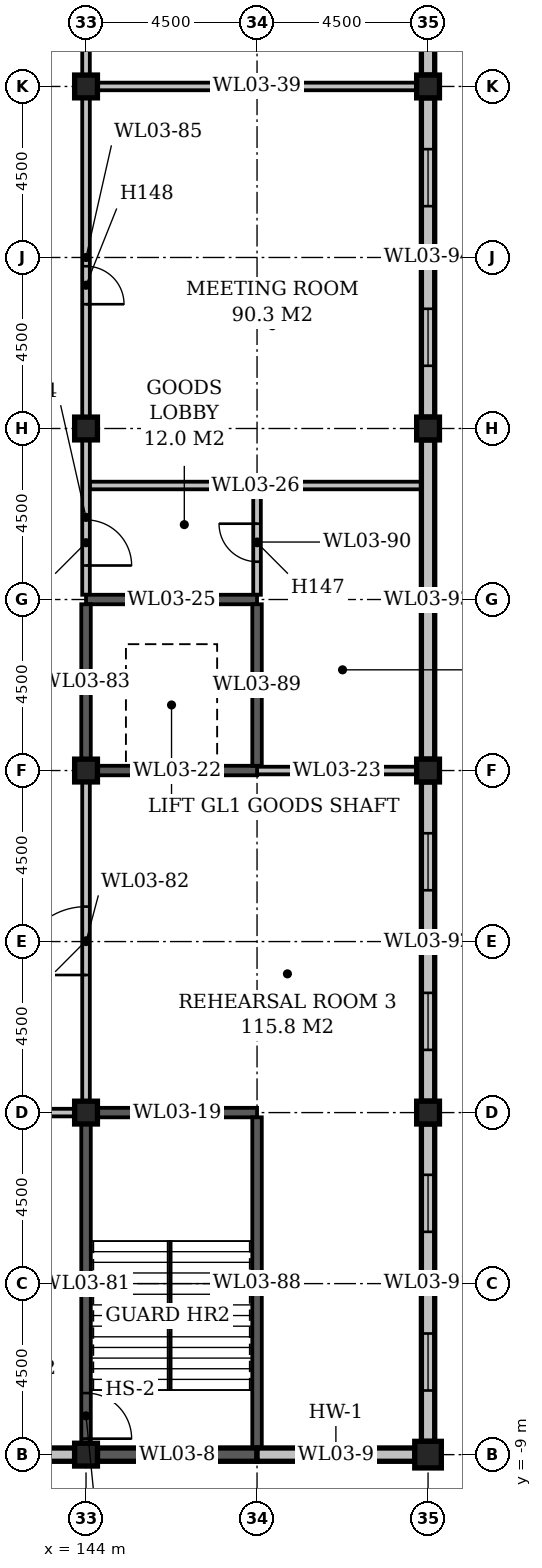
"""IFC4 building model, lengths in metres.
Left out: names, types, materials, properties, quantities, classifications, styles, units other than length and angle.
Written with IfcOpenShell. Run it as: python <this file> out.ifc"""

import sys

from ifc_helpers import new_model, si_unit, direction, frame, frame_2d, origin, origin_2d, place, context, subcontext, project, spatial, rectangle, extrude, element, fill, save


model = new_model("IFC4")
c1 = context("Model", 3, precision=1e-05, world=origin(), true_north=direction((0.0, 1.0)))
c2 = subcontext(c1, "Body", "Model", "MODEL_VIEW")
j1 = project(units=[si_unit("LENGTHUNIT", "METRE"), si_unit("PLANEANGLEUNIT", "RADIAN")], contexts=[c1])
p1 = place(None, origin())
s1 = spatial("IfcSite", under=j1, at=p1, CompositionType="ELEMENT")
p2 = place(p1, origin())
s2 = spatial("IfcBuilding", under=s1, at=p2, CompositionType="ELEMENT")
p3 = place(p2, frame((0.0, 0.0, 19.0)))
s3 = spatial("IfcBuildingStorey", under=s2, at=p3, CompositionType="ELEMENT", Elevation=19.0)
for number, where, z_axis, x_axis in (
    (1, (144.0, -9.0, 0.0), (0.0, 0.0, 1.0), (1.0, 0.0, 0.0)),
    (2, (144.0, 0.0, 0.0), (0.0, 0.0, 1.0), (1.0, 0.0, 0.0)),
    (3, (144.0, 9.0, 0.0), (0.0, 0.0, 1.0), (1.0, 0.0, 0.0)),
    (4, (144.0, 18.0, 0.0), (0.0, 0.0, 1.0), (1.0, 0.0, 0.0)),
    (5, (144.0, 27.0, 0.0), (0.0, 0.0, 1.0), (1.0, 0.0, 0.0)),
):
    element("IfcColumn", number, at=place(p3, frame(where, z_axis=z_axis, x_axis=x_axis)), inside=s3, PredefinedType="COLUMN", context=c2, shape_type="SweptSolid", body=[
        extrude(rectangle(XDim=0.6, YDim=0.6, at=origin_2d()), origin(), (0.0, 0.0, 1.0), 4.7),
    ])
p4 = place(p3, frame((153.0, -9.0, 0.0), z_axis=(0.0, 0.0, 1.0), x_axis=(1.0, 0.0, 0.0)))
e6 = element("IfcColumn", 6, at=p4, inside=s3, PredefinedType="COLUMN", context=c2, shape_type="SweptSolid", body=[
    extrude(rectangle(XDim=0.7, YDim=0.7, at=origin_2d()), origin(), (0.0, 0.0, 1.0), 4.7),
])
for number, where, z_axis, x_axis in (
    (7, (153.0, 0.0, 0.0), (0.0, 0.0, 1.0), (1.0, 0.0, 0.0)),
    (8, (153.0, 9.0, 0.0), (0.0, 0.0, 1.0), (1.0, 0.0, 0.0)),
    (9, (153.0, 18.0, 0.0), (0.0, 0.0, 1.0), (1.0, 0.0, 0.0)),
    (10, (153.0, 27.0, 0.0), (0.0, 0.0, 1.0), (1.0, 0.0, 0.0)),
):
    element("IfcColumn", number, at=place(p3, frame(where, z_axis=z_axis, x_axis=x_axis)), inside=s3, PredefinedType="COLUMN", context=c2, shape_type="SweptSolid", body=[
        extrude(rectangle(XDim=0.6, YDim=0.6, at=origin_2d()), origin(), (0.0, 0.0, 1.0), 4.7),
    ])
p5 = place(p3, frame((135.3, -9.0, 0.0), z_axis=(0.0, 0.0, 1.0), x_axis=(1.0, 0.0, 0.0)))
e11 = element("IfcWall", 11, at=p5, inside=s3, PredefinedType="STANDARD", context=c2, shape_type="SweptSolid", body=[
    extrude(rectangle(XDim=8.4, YDim=0.35, at=frame_2d((4.2, 0.0))), origin(), (0.0, 0.0, 1.0), 4.1),
])
p6 = place(p5, frame((1.35, 0.0, 1.0)))
e12 = element("IfcOpeningElement", 12, at=p6, cuts=e11, PredefinedType="OPENING", context=c2, shape_type="SweptSolid", body=[
    extrude(rectangle(XDim=1.5, YDim=2.4, at=frame_2d((0.75, 1.2))), frame((0.0, 0.187, 0.0), z_axis=(0.0, -1.0, 0.0), x_axis=(1.0, 0.0, 0.0)), (0.0, 0.0, 1.0), 0.374),
])
p7 = place(p3, frame((144.3, -9.0, 0.0), z_axis=(0.0, 0.0, 1.0), x_axis=(1.0, 0.0, 0.0)))
e13 = element("IfcWall", 13, at=p7, inside=s3, PredefinedType="STANDARD", context=c2, shape_type="SweptSolid", body=[
    extrude(rectangle(XDim=4.2, YDim=0.35, at=frame_2d((2.1, 0.0))), origin(), (0.0, 0.0, 1.0), 5.0),
])
p8 = place(p3, frame((148.5, -9.0, 0.0), z_axis=(0.0, 0.0, 1.0), x_axis=(1.0, 0.0, 0.0)))
e14 = element("IfcWall", 14, at=p8, inside=s3, PredefinedType="STANDARD", context=c2, shape_type="SweptSolid", body=[
    extrude(rectangle(XDim=4.15, YDim=0.35, at=frame_2d((2.075, 0.0))), origin(), (0.0, 0.0, 1.0), 4.1),
])
p9 = place(p8, frame((1.325, 0.0, 1.0)))
e15 = element("IfcOpeningElement", 15, at=p9, cuts=e14, PredefinedType="OPENING", context=c2, shape_type="SweptSolid", body=[
    extrude(rectangle(XDim=1.5, YDim=2.4, at=frame_2d((0.75, 1.2))), frame((0.0, 0.187, 0.0), z_axis=(0.0, -1.0, 0.0), x_axis=(1.0, 0.0, 0.0)), (0.0, 0.0, 1.0), 0.374),
])
p10 = place(p3, frame((135.4, 0.0, 0.0), z_axis=(0.0, 0.0, 1.0), x_axis=(1.0, 0.0, 0.0)))
e16 = element("IfcWall", 16, at=p10, inside=s3, PredefinedType="STANDARD", context=c2, shape_type="SweptSolid", body=[
    extrude(rectangle(XDim=8.3, YDim=0.2, at=frame_2d((4.15, 0.0))), origin(), (0.0, 0.0, 1.0), 4.7),
])
p11 = place(p10, frame((5.77, 0.0, 0.0)))
e17 = element("IfcOpeningElement", 17, at=p11, cuts=e16, PredefinedType="OPENING", context=c2, shape_type="SweptSolid", body=[
    extrude(rectangle(XDim=1.2, YDim=2.1, at=frame_2d((0.6, 1.05))), frame((0.0, 0.112, 0.0), z_axis=(0.0, -1.0, 0.0), x_axis=(1.0, 0.0, 0.0)), (0.0, 0.0, 1.0), 0.224),
])
p12 = place(p10, frame((1.37, 0.0, 0.0)))
e18 = element("IfcOpeningElement", 18, at=p12, cuts=e16, PredefinedType="OPENING", context=c2, shape_type="SweptSolid", body=[
    extrude(rectangle(XDim=1.0, YDim=2.1, at=frame_2d((0.5, 1.05))), frame((0.0, 0.112, 0.0), z_axis=(0.0, -1.0, 0.0), x_axis=(1.0, 0.0, 0.0)), (0.0, 0.0, 1.0), 0.224),
])
for number, where, z_axis, x_axis in (
    (19, (144.3, 0.0, 0.0), (0.0, 0.0, 1.0), (1.0, 0.0, 0.0)),
    (20, (144.3, 9.0, 0.0), (0.0, 0.0, 1.0), (1.0, 0.0, 0.0)),
):
    element("IfcWall", number, at=place(p3, frame(where, z_axis=z_axis, x_axis=x_axis)), inside=s3, PredefinedType="STANDARD", context=c2, shape_type="SweptSolid", body=[
        extrude(rectangle(XDim=4.2, YDim=0.25, at=frame_2d((2.1, 0.0))), origin(), (0.0, 0.0, 1.0), 5.0),
    ])
p13 = place(p3, frame((148.5, 9.0, 0.0), z_axis=(0.0, 0.0, 1.0), x_axis=(1.0, 0.0, 0.0)))
e21 = element("IfcWall", 21, at=p13, inside=s3, PredefinedType="STANDARD", context=c2, shape_type="SweptSolid", body=[
    extrude(rectangle(XDim=4.2, YDim=0.2, at=frame_2d((2.1, 0.0))), origin(), (0.0, 0.0, 1.0), 4.7),
])
p14 = place(p3, frame((144.0, 13.5, 0.0), z_axis=(0.0, 0.0, 1.0), x_axis=(1.0, 0.0, 0.0)))
e22 = element("IfcWall", 22, at=p14, inside=s3, PredefinedType="STANDARD", context=c2, shape_type="SweptSolid", body=[
    extrude(rectangle(XDim=4.5, YDim=0.25, at=frame_2d((2.25, 0.0))), origin(), (0.0, 0.0, 1.0), 5.0),
])
p15 = place(p14, frame((1.72, 0.0, 0.0)))
e23 = element("IfcOpeningElement", 23, at=p15, cuts=e22, PredefinedType="OPENING", context=c2, shape_type="SweptSolid", body=[
    extrude(rectangle(XDim=1.1, YDim=2.1, at=frame_2d((0.55, 1.05))), frame((0.0, 0.137, 0.0), z_axis=(0.0, -1.0, 0.0), x_axis=(1.0, 0.0, 0.0)), (0.0, 0.0, 1.0), 0.274),
])
p16 = place(p3, frame((144.1, 16.5, 0.0), z_axis=(0.0, 0.0, 1.0), x_axis=(1.0, 0.0, 0.0)))
e24 = element("IfcWall", 24, at=p16, inside=s3, PredefinedType="STANDARD", context=c2, shape_type="SweptSolid", body=[
    extrude(rectangle(XDim=8.725, YDim=0.2, at=frame_2d((4.362, 0.0))), origin(), (0.0, 0.0, 1.0), 4.7),
])
p17 = place(p3, frame((144.3, 27.0, 0.0), z_axis=(0.0, 0.0, 1.0), x_axis=(1.0, 0.0, 0.0)))
e25 = element("IfcWall", 25, at=p17, inside=s3, PredefinedType="STANDARD", context=c2, shape_type="SweptSolid", body=[
    extrude(rectangle(XDim=8.4, YDim=0.2, at=frame_2d((4.2, 0.0))), origin(), (0.0, 0.0, 1.0), 4.7),
])
p18 = place(p3, frame((144.0, -8.7, 0.0), z_axis=(0.0, 0.0, 1.0), x_axis=(0.0, 1.0, 0.0)))
e26 = element("IfcWall", 26, at=p18, inside=s3, PredefinedType="STANDARD", context=c2, shape_type="SweptSolid", body=[
    extrude(rectangle(XDim=8.4, YDim=0.25, at=frame_2d((4.2, 0.0))), origin(), (0.0, 0.0, 1.0), 5.0),
])
p19 = place(p18, frame((0.12, 0.0, 0.0)))
e27 = element("IfcOpeningElement", 27, at=p19, cuts=e26, PredefinedType="OPENING", context=c2, shape_type="SweptSolid", body=[
    extrude(rectangle(XDim=1.2, YDim=2.1, at=frame_2d((0.6, 1.05))), frame((0.0, 0.137, 0.0), z_axis=(0.0, -1.0, 0.0), x_axis=(1.0, 0.0, 0.0)), (0.0, 0.0, 1.0), 0.274),
])
p20 = place(p3, frame((144.0, 0.3, 0.0), z_axis=(0.0, 0.0, 1.0), x_axis=(0.0, 1.0, 0.0)))
e28 = element("IfcWall", 28, at=p20, inside=s3, PredefinedType="STANDARD", context=c2, shape_type="SweptSolid", body=[
    extrude(rectangle(XDim=8.4, YDim=0.2, at=frame_2d((4.2, 0.0))), origin(), (0.0, 0.0, 1.0), 4.7),
])
p21 = place(p20, frame((3.32, 0.0, 0.0)))
e29 = element("IfcOpeningElement", 29, at=p21, cuts=e28, PredefinedType="OPENING", context=c2, shape_type="SweptSolid", body=[
    extrude(rectangle(XDim=1.8, YDim=2.4, at=frame_2d((0.9, 1.2))), frame((0.0, 0.112, 0.0), z_axis=(0.0, -1.0, 0.0), x_axis=(1.0, 0.0, 0.0)), (0.0, 0.0, 1.0), 0.224),
])
p22 = place(p3, frame((144.0, 9.3, 0.0), z_axis=(0.0, 0.0, 1.0), x_axis=(0.0, 1.0, 0.0)))
e30 = element("IfcWall", 30, at=p22, inside=s3, PredefinedType="STANDARD", context=c2, shape_type="SweptSolid", body=[
    extrude(rectangle(XDim=4.075, YDim=0.25, at=frame_2d((2.038, 0.0))), origin(), (0.0, 0.0, 1.0), 5.0),
])
p23 = place(p3, frame((144.0, 13.625, 0.0), z_axis=(0.0, 0.0, 1.0), x_axis=(0.0, 1.0, 0.0)))
e31 = element("IfcWall", 31, at=p23, inside=s3, PredefinedType="STANDARD", context=c2, shape_type="SweptSolid", body=[
    extrude(rectangle(XDim=4.075, YDim=0.2, at=frame_2d((2.038, 0.0))), origin(), (0.0, 0.0, 1.0), 4.7),
])
p24 = place(p23, frame((0.77, 0.0, 0.0)))
e32 = element("IfcOpeningElement", 32, at=p24, cuts=e31, PredefinedType="OPENING", context=c2, shape_type="SweptSolid", body=[
    extrude(rectangle(XDim=1.2, YDim=2.1, at=frame_2d((0.6, 1.05))), frame((0.0, 0.112, 0.0), z_axis=(0.0, -1.0, 0.0), x_axis=(1.0, 0.0, 0.0)), (0.0, 0.0, 1.0), 0.224),
])
p25 = place(p3, frame((144.0, 18.3, 0.0), z_axis=(0.0, 0.0, 1.0), x_axis=(0.0, 1.0, 0.0)))
e33 = element("IfcWall", 33, at=p25, inside=s3, PredefinedType="STANDARD", context=c2, shape_type="SweptSolid", body=[
    extrude(rectangle(XDim=8.4, YDim=0.2, at=frame_2d((4.2, 0.0))), origin(), (0.0, 0.0, 1.0), 4.7),
])
p26 = place(p25, frame((2.97, 0.0, 0.0)))
e34 = element("IfcOpeningElement", 34, at=p26, cuts=e33, PredefinedType="OPENING", context=c2, shape_type="SweptSolid", body=[
    extrude(rectangle(XDim=1.0, YDim=2.1, at=frame_2d((0.5, 1.05))), frame((0.0, 0.112, 0.0), z_axis=(0.0, -1.0, 0.0), x_axis=(1.0, 0.0, 0.0)), (0.0, 0.0, 1.0), 0.224),
])
p27 = place(p3, frame((144.0, 27.3, 0.0), z_axis=(0.0, 0.0, 1.0), x_axis=(0.0, 1.0, 0.0)))
e35 = element("IfcWall", 35, at=p27, inside=s3, PredefinedType="STANDARD", context=c2, shape_type="SweptSolid", body=[
    extrude(rectangle(XDim=8.4, YDim=0.2, at=frame_2d((4.2, 0.0))), origin(), (0.0, 0.0, 1.0), 4.7),
])
p28 = place(p27, frame((3.72, 0.0, 0.0)))
e36 = element("IfcOpeningElement", 36, at=p28, cuts=e35, PredefinedType="OPENING", context=c2, shape_type="SweptSolid", body=[
    extrude(rectangle(XDim=1.0, YDim=2.1, at=frame_2d((0.5, 1.05))), frame((0.0, 0.112, 0.0), z_axis=(0.0, -1.0, 0.0), x_axis=(1.0, 0.0, 0.0)), (0.0, 0.0, 1.0), 0.224),
])
p29 = place(p3, frame((148.5, -8.825, 0.0), z_axis=(0.0, 0.0, 1.0), x_axis=(0.0, 1.0, 0.0)))
e37 = element("IfcWall", 37, at=p29, inside=s3, PredefinedType="STANDARD", context=c2, shape_type="SweptSolid", body=[
    extrude(rectangle(XDim=8.7, YDim=0.25, at=frame_2d((4.35, 0.0))), origin(), (0.0, 0.0, 1.0), 5.0),
])
p30 = place(p3, frame((148.5, 9.125, 0.0), z_axis=(0.0, 0.0, 1.0), x_axis=(0.0, 1.0, 0.0)))
e38 = element("IfcWall", 38, at=p30, inside=s3, PredefinedType="STANDARD", context=c2, shape_type="SweptSolid", body=[
    extrude(rectangle(XDim=4.25, YDim=0.25, at=frame_2d((2.125, 0.0))), origin(), (0.0, 0.0, 1.0), 5.0),
])
p31 = place(p3, frame((148.5, 13.625, 0.0), z_axis=(0.0, 0.0, 1.0), x_axis=(0.0, 1.0, 0.0)))
e39 = element("IfcWall", 39, at=p31, inside=s3, PredefinedType="STANDARD", context=c2, shape_type="SweptSolid", body=[
    extrude(rectangle(XDim=2.775, YDim=0.2, at=frame_2d((1.387, 0.0))), origin(), (0.0, 0.0, 1.0), 4.7),
])
p32 = place(p31, frame((0.87, 0.0, 0.0)))
e40 = element("IfcOpeningElement", 40, at=p32, cuts=e39, PredefinedType="OPENING", context=c2, shape_type="SweptSolid", body=[
    extrude(rectangle(XDim=1.0, YDim=2.1, at=frame_2d((0.5, 1.05))), frame((0.0, 0.112, 0.0), z_axis=(0.0, -1.0, 0.0), x_axis=(1.0, 0.0, 0.0)), (0.0, 0.0, 1.0), 0.224),
])
p33 = place(p3, frame((153.0, -8.65, 0.0), z_axis=(0.0, 0.0, 1.0), x_axis=(0.0, 1.0, 0.0)))
e41 = element("IfcWall", 41, at=p33, inside=s3, PredefinedType="STANDARD", context=c2, shape_type="SweptSolid", body=[
    extrude(rectangle(XDim=8.35, YDim=0.35, at=frame_2d((4.175, 0.0))), origin(), (0.0, 0.0, 1.0), 4.1),
])
p34 = place(p33, frame((1.337, 0.0, 1.0)))
e42 = element("IfcOpeningElement", 42, at=p34, cuts=e41, PredefinedType="OPENING", context=c2, shape_type="SweptSolid", body=[
    extrude(rectangle(XDim=1.5, YDim=2.4, at=frame_2d((0.75, 1.2))), frame((0.0, 0.187, 0.0), z_axis=(0.0, -1.0, 0.0), x_axis=(1.0, 0.0, 0.0)), (0.0, 0.0, 1.0), 0.374),
])
p35 = place(p33, frame((5.512, 0.0, 1.0)))
e43 = element("IfcOpeningElement", 43, at=p35, cuts=e41, PredefinedType="OPENING", context=c2, shape_type="SweptSolid", body=[
    extrude(rectangle(XDim=1.5, YDim=2.4, at=frame_2d((0.75, 1.2))), frame((0.0, 0.187, 0.0), z_axis=(0.0, -1.0, 0.0), x_axis=(1.0, 0.0, 0.0)), (0.0, 0.0, 1.0), 0.374),
])
p36 = place(p3, frame((153.0, 0.3, 0.0), z_axis=(0.0, 0.0, 1.0), x_axis=(0.0, 1.0, 0.0)))
e44 = element("IfcWall", 44, at=p36, inside=s3, PredefinedType="STANDARD", context=c2, shape_type="SweptSolid", body=[
    extrude(rectangle(XDim=8.4, YDim=0.35, at=frame_2d((4.2, 0.0))), origin(), (0.0, 0.0, 1.0), 4.1),
])
p37 = place(p36, frame((1.35, 0.0, 1.0)))
e45 = element("IfcOpeningElement", 45, at=p37, cuts=e44, PredefinedType="OPENING", context=c2, shape_type="SweptSolid", body=[
    extrude(rectangle(XDim=1.5, YDim=2.4, at=frame_2d((0.75, 1.2))), frame((0.0, 0.187, 0.0), z_axis=(0.0, -1.0, 0.0), x_axis=(1.0, 0.0, 0.0)), (0.0, 0.0, 1.0), 0.374),
])
p38 = place(p36, frame((5.55, 0.0, 1.0)))
e46 = element("IfcOpeningElement", 46, at=p38, cuts=e44, PredefinedType="OPENING", context=c2, shape_type="SweptSolid", body=[
    extrude(rectangle(XDim=1.5, YDim=2.4, at=frame_2d((0.75, 1.2))), frame((0.0, 0.187, 0.0), z_axis=(0.0, -1.0, 0.0), x_axis=(1.0, 0.0, 0.0)), (0.0, 0.0, 1.0), 0.374),
])
p39 = place(p3, frame((153.0, 9.3, 0.0), z_axis=(0.0, 0.0, 1.0), x_axis=(0.0, 1.0, 0.0)))
e47 = element("IfcWall", 47, at=p39, inside=s3, PredefinedType="STANDARD", context=c2, shape_type="SweptSolid", body=[
    extrude(rectangle(XDim=8.4, YDim=0.35, at=frame_2d((4.2, 0.0))), origin(), (0.0, 0.0, 1.0), 4.1),
])
p40 = place(p3, frame((153.0, 18.3, 0.0), z_axis=(0.0, 0.0, 1.0), x_axis=(0.0, 1.0, 0.0)))
e48 = element("IfcWall", 48, at=p40, inside=s3, PredefinedType="STANDARD", context=c2, shape_type="SweptSolid", body=[
    extrude(rectangle(XDim=8.4, YDim=0.35, at=frame_2d((4.2, 0.0))), origin(), (0.0, 0.0, 1.0), 4.1),
])
p41 = place(p40, frame((1.35, 0.0, 1.0)))
e49 = element("IfcOpeningElement", 49, at=p41, cuts=e48, PredefinedType="OPENING", context=c2, shape_type="SweptSolid", body=[
    extrude(rectangle(XDim=1.5, YDim=2.4, at=frame_2d((0.75, 1.2))), frame((0.0, 0.187, 0.0), z_axis=(0.0, -1.0, 0.0), x_axis=(1.0, 0.0, 0.0)), (0.0, 0.0, 1.0), 0.374),
])
p42 = place(p40, frame((5.55, 0.0, 1.0)))
e50 = element("IfcOpeningElement", 50, at=p42, cuts=e48, PredefinedType="OPENING", context=c2, shape_type="SweptSolid", body=[
    extrude(rectangle(XDim=1.5, YDim=2.4, at=frame_2d((0.75, 1.2))), frame((0.0, 0.187, 0.0), z_axis=(0.0, -1.0, 0.0), x_axis=(1.0, 0.0, 0.0)), (0.0, 0.0, 1.0), 0.374),
])
p43 = place(p3, frame((153.0, 27.3, 0.0), z_axis=(0.0, 0.0, 1.0), x_axis=(0.0, 1.0, 0.0)))
e51 = element("IfcWall", 51, at=p43, inside=s3, PredefinedType="STANDARD", context=c2, shape_type="SweptSolid", body=[
    extrude(rectangle(XDim=8.4, YDim=0.35, at=frame_2d((4.2, 0.0))), origin(), (0.0, 0.0, 1.0), 4.1),
])
p44 = place(p43, frame((1.35, 0.0, 1.0)))
e52 = element("IfcOpeningElement", 52, at=p44, cuts=e51, PredefinedType="OPENING", context=c2, shape_type="SweptSolid", body=[
    extrude(rectangle(XDim=1.5, YDim=2.4, at=frame_2d((0.75, 1.2))), frame((0.0, 0.187, 0.0), z_axis=(0.0, -1.0, 0.0), x_axis=(1.0, 0.0, 0.0)), (0.0, 0.0, 1.0), 0.374),
])
p45 = place(p43, frame((5.55, 0.0, 1.0)))
e53 = element("IfcOpeningElement", 53, at=p45, cuts=e51, PredefinedType="OPENING", context=c2, shape_type="SweptSolid", body=[
    extrude(rectangle(XDim=1.5, YDim=2.4, at=frame_2d((0.75, 1.2))), frame((0.0, 0.187, 0.0), z_axis=(0.0, -1.0, 0.0), x_axis=(1.0, 0.0, 0.0)), (0.0, 0.0, 1.0), 0.374),
])
p46 = place(p24, frame((1.2, 0.0, 0.0), z_axis=(0.0, 0.0, 1.0), x_axis=(-1.0, 0.0, 0.0)))
e54 = element("IfcDoor", 54, at=p46, inside=s3, OperationType="SINGLE_SWING_RIGHT", PredefinedType="DOOR", context=c2, shape_type="SweptSolid", body=[
    extrude(rectangle(XDim=1.2, YDim=2.1, at=frame_2d((0.6, 1.05))), frame((0.0, 0.025, 0.0), z_axis=(0.0, -1.0, 0.0), x_axis=(1.0, 0.0, 0.0)), (0.0, 0.0, 1.0), 0.05),
])
fill(e32, e54)
p47 = place(p19, frame((1.2, 0.0, 0.0), z_axis=(0.0, 0.0, 1.0), x_axis=(-1.0, 0.0, 0.0)))
e55 = element("IfcDoor", 55, at=p47, inside=s3, OperationType="SINGLE_SWING_RIGHT", PredefinedType="DOOR", context=c2, shape_type="SweptSolid", body=[
    extrude(rectangle(XDim=1.2, YDim=2.1, at=frame_2d((0.6, 1.05))), frame((0.0, 0.025, 0.0), z_axis=(0.0, -1.0, 0.0), x_axis=(1.0, 0.0, 0.0)), (0.0, 0.0, 1.0), 0.05),
])
fill(e27, e55)
p48 = place(p21, origin())
e56 = element("IfcDoor", 56, at=p48, inside=s3, OperationType="DOUBLE_DOOR_SINGLE_SWING", PredefinedType="DOOR", context=c2, shape_type="SweptSolid", body=[
    extrude(rectangle(XDim=1.8, YDim=2.4, at=frame_2d((0.9, 1.2))), frame((0.0, 0.025, 0.0), z_axis=(0.0, -1.0, 0.0), x_axis=(1.0, 0.0, 0.0)), (0.0, 0.0, 1.0), 0.05),
])
fill(e29, e56)
p49 = place(p32, frame((1.0, 0.0, 0.0), z_axis=(0.0, 0.0, 1.0), x_axis=(-1.0, 0.0, 0.0)))
e57 = element("IfcDoor", 57, at=p49, inside=s3, OperationType="SINGLE_SWING_LEFT", PredefinedType="DOOR", context=c2, shape_type="SweptSolid", body=[
    extrude(rectangle(XDim=1.0, YDim=2.1, at=frame_2d((0.5, 1.05))), frame((0.0, 0.025, 0.0), z_axis=(0.0, -1.0, 0.0), x_axis=(1.0, 0.0, 0.0)), (0.0, 0.0, 1.0), 0.05),
])
fill(e40, e57)
p50 = place(p26, frame((1.0, 0.0, 0.0), z_axis=(0.0, 0.0, 1.0), x_axis=(-1.0, 0.0, 0.0)))
e58 = element("IfcDoor", 58, at=p50, inside=s3, OperationType="SINGLE_SWING_RIGHT", PredefinedType="DOOR", context=c2, shape_type="SweptSolid", body=[
    extrude(rectangle(XDim=1.0, YDim=2.1, at=frame_2d((0.5, 1.05))), frame((0.0, 0.025, 0.0), z_axis=(0.0, -1.0, 0.0), x_axis=(1.0, 0.0, 0.0)), (0.0, 0.0, 1.0), 0.05),
])
fill(e34, e58)
p51 = place(p15, origin())
e59 = element("IfcDoor", 59, at=p51, inside=s3, OperationType="SLIDING_TO_LEFT", PredefinedType="DOOR", context=c2, shape_type="SweptSolid", body=[
    extrude(rectangle(XDim=1.1, YDim=2.1, at=frame_2d((0.55, 1.05))), frame((0.0, 0.025, 0.0), z_axis=(0.0, -1.0, 0.0), x_axis=(1.0, 0.0, 0.0)), (0.0, 0.0, 1.0), 0.05),
])
fill(e23, e59)
p52 = place(p9, origin())
e60 = element("IfcWindow", 60, at=p52, inside=s3, PartitioningType="SINGLE_PANEL", PredefinedType="WINDOW", context=c2, shape_type="SweptSolid", body=[
    extrude(rectangle(XDim=1.5, YDim=2.4, at=frame_2d((0.75, 1.2))), frame((0.0, 0.03, 0.0), z_axis=(0.0, -1.0, 0.0), x_axis=(1.0, 0.0, 0.0)), (0.0, 0.0, 1.0), 0.06),
])
fill(e15, e60)
p53 = place(p34, origin())
e61 = element("IfcWindow", 61, at=p53, inside=s3, PartitioningType="SINGLE_PANEL", PredefinedType="WINDOW", context=c2, shape_type="SweptSolid", body=[
    extrude(rectangle(XDim=1.5, YDim=2.4, at=frame_2d((0.75, 1.2))), frame((0.0, 0.03, 0.0), z_axis=(0.0, -1.0, 0.0), x_axis=(1.0, 0.0, 0.0)), (0.0, 0.0, 1.0), 0.06),
])
fill(e42, e61)
p54 = place(p35, origin())
e62 = element("IfcWindow", 62, at=p54, inside=s3, PartitioningType="SINGLE_PANEL", PredefinedType="WINDOW", context=c2, shape_type="SweptSolid", body=[
    extrude(rectangle(XDim=1.5, YDim=2.4, at=frame_2d((0.75, 1.2))), frame((0.0, 0.03, 0.0), z_axis=(0.0, -1.0, 0.0), x_axis=(1.0, 0.0, 0.0)), (0.0, 0.0, 1.0), 0.06),
])
fill(e43, e62)
p55 = place(p37, origin())
e63 = element("IfcWindow", 63, at=p55, inside=s3, PartitioningType="SINGLE_PANEL", PredefinedType="WINDOW", context=c2, shape_type="SweptSolid", body=[
    extrude(rectangle(XDim=1.5, YDim=2.4, at=frame_2d((0.75, 1.2))), frame((0.0, 0.03, 0.0), z_axis=(0.0, -1.0, 0.0), x_axis=(1.0, 0.0, 0.0)), (0.0, 0.0, 1.0), 0.06),
])
fill(e45, e63)
p56 = place(p38, origin())
e64 = element("IfcWindow", 64, at=p56, inside=s3, PartitioningType="SINGLE_PANEL", PredefinedType="WINDOW", context=c2, shape_type="SweptSolid", body=[
    extrude(rectangle(XDim=1.5, YDim=2.4, at=frame_2d((0.75, 1.2))), frame((0.0, 0.03, 0.0), z_axis=(0.0, -1.0, 0.0), x_axis=(1.0, 0.0, 0.0)), (0.0, 0.0, 1.0), 0.06),
])
fill(e46, e64)
p57 = place(p41, origin())
e65 = element("IfcWindow", 65, at=p57, inside=s3, PartitioningType="SINGLE_PANEL", PredefinedType="WINDOW", context=c2, shape_type="SweptSolid", body=[
    extrude(rectangle(XDim=1.5, YDim=2.4, at=frame_2d((0.75, 1.2))), frame((0.0, 0.03, 0.0), z_axis=(0.0, -1.0, 0.0), x_axis=(1.0, 0.0, 0.0)), (0.0, 0.0, 1.0), 0.06),
])
fill(e49, e65)
p58 = place(p42, origin())
e66 = element("IfcWindow", 66, at=p58, inside=s3, PartitioningType="SINGLE_PANEL", PredefinedType="WINDOW", context=c2, shape_type="SweptSolid", body=[
    extrude(rectangle(XDim=1.5, YDim=2.4, at=frame_2d((0.75, 1.2))), frame((0.0, 0.03, 0.0), z_axis=(0.0, -1.0, 0.0), x_axis=(1.0, 0.0, 0.0)), (0.0, 0.0, 1.0), 0.06),
])
fill(e50, e66)
save(model, sys.argv[1])
